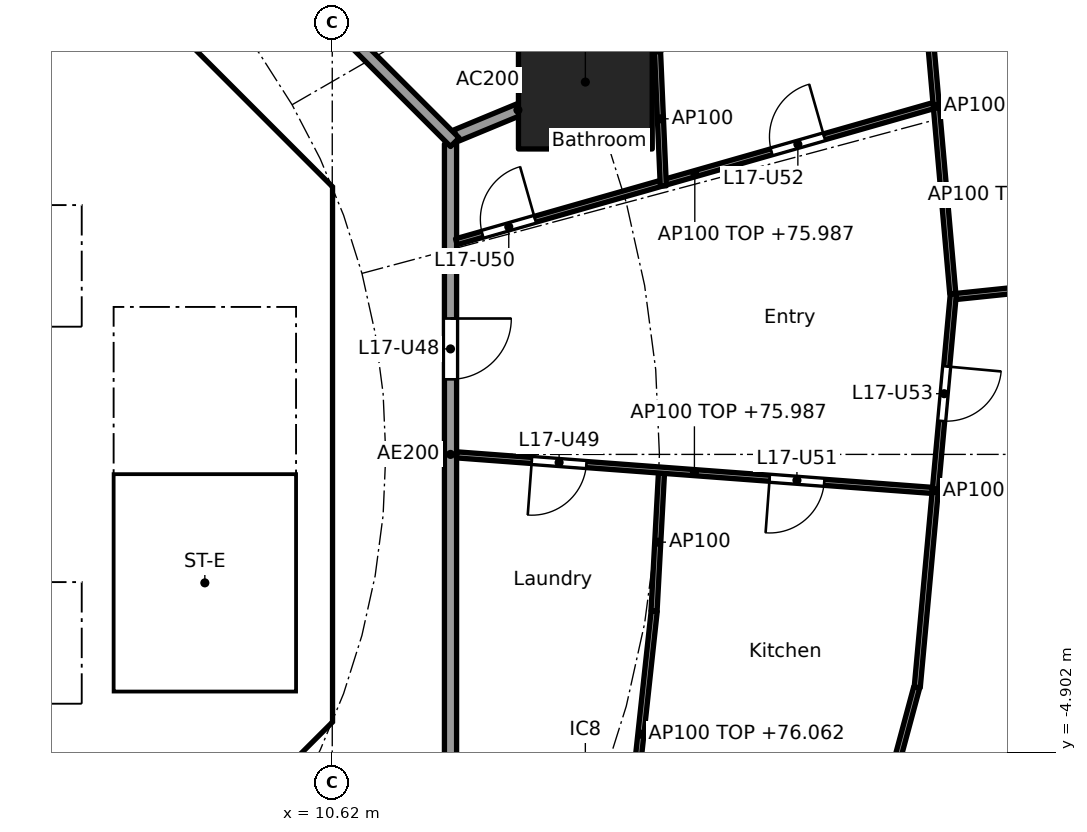
"""IFC4 building model, lengths in metres.
Left out: names, types, materials, properties, quantities, classifications, styles, units other than length and angle.
Written with IfcOpenShell. Run it as: python <this file> out.ifc"""

import sys

from ifc_helpers import new_model, si_unit, direction, frame, frame_2d, origin, origin_2d, place, context, subcontext, project, spatial, polyline, rectangle, outline, extrude, element, fill, save


model = new_model("IFC4")
c1 = context("Model", 3, precision=1e-05, world=origin(), true_north=direction((0.0, 1.0)))
c2 = subcontext(c1, "Body", "Model", "MODEL_VIEW")
j1 = project(units=[si_unit("LENGTHUNIT", "METRE"), si_unit("PLANEANGLEUNIT", "RADIAN")], contexts=[c1])
p1 = place(None, origin())
s1 = spatial("IfcSite", under=j1, at=p1, CompositionType="ELEMENT")
p2 = place(p1, origin())
s2 = spatial("IfcBuilding", under=s1, at=p2, CompositionType="ELEMENT")
p3 = place(p2, frame((0.0, 0.0, 73.3)))
s3 = spatial("IfcBuildingStorey", under=s2, at=p3, CompositionType="ELEMENT", Elevation=73.3)
p4 = place(p3, frame((14.782, 6.123, 0.0), z_axis=(0.0, 0.0, 1.0), x_axis=(1.0, 0.0, 0.0)))
e1 = element("IfcColumn", 1, at=p4, inside=s3, PredefinedType="COLUMN", context=c2, shape_type="SweptSolid", body=[
    extrude(rectangle(XDim=2.2, YDim=2.2, at=origin_2d()), origin(), (0.0, 0.0, 1.0), 3.7),
])
p5 = place(p3, frame((9.988, 4.613, 0.0), z_axis=(0.0, 0.0, 1.0), x_axis=(-0.707106781187, 0.707106781187, 0.0)))
e2 = element("IfcWall", 2, at=p5, inside=s3, PredefinedType="SHEAR", context=c2, shape_type="SweptSolid", body=[
    extrude(rectangle(XDim=7.602, YDim=0.6, at=frame_2d((3.801, 0.0))), origin(), (0.0, 0.0, 1.0), 3.44),
])
p6 = place(p5, frame((3.201, 0.0, 0.0)))
e3 = element("IfcOpeningElement", 3, at=p6, cuts=e2, PredefinedType="OPENING", context=c2, shape_type="SweptSolid", body=[
    extrude(rectangle(XDim=1.2, YDim=2.1, at=frame_2d((0.6, 1.05))), frame((0.0, 0.31, 0.0), z_axis=(0.0, -1.0, 0.0), x_axis=(1.0, 0.0, 0.0)), (0.0, 0.0, 1.0), 0.62),
])
p7 = place(p3, frame((4.613, -9.988, 0.0), z_axis=(0.0, 0.0, 1.0), x_axis=(0.707106781187, 0.707106781187, 0.0)))
e4 = element("IfcWall", 4, at=p7, inside=s3, PredefinedType="SHEAR", context=c2, shape_type="SweptSolid", body=[
    extrude(rectangle(XDim=7.602, YDim=0.6, at=frame_2d((3.801, 0.0))), origin(), (0.0, 0.0, 1.0), 3.44),
])
p8 = place(p7, frame((3.201, 0.0, 0.0)))
e5 = element("IfcOpeningElement", 5, at=p8, cuts=e4, PredefinedType="OPENING", context=c2, shape_type="SweptSolid", body=[
    extrude(rectangle(XDim=1.2, YDim=2.1, at=frame_2d((0.6, 1.05))), frame((0.0, 0.31, 0.0), z_axis=(0.0, -1.0, 0.0), x_axis=(1.0, 0.0, 0.0)), (0.0, 0.0, 1.0), 0.62),
])
p9 = place(p3, frame((-6.7, 2.0, 0.0), z_axis=(0.0, 0.0, 1.0), x_axis=(1.0, 0.0, 0.0)))
e6 = element("IfcWall", 6, at=p9, inside=s3, PredefinedType="SOLIDWALL", context=c2, shape_type="SweptSolid", body=[
    extrude(rectangle(XDim=13.4, YDim=0.2, at=frame_2d((6.7, 0.0))), origin(), (0.0, 0.0, 1.0), 3.44),
])
p10 = place(p9, frame((0.65, 0.0, 0.0)))
e7 = element("IfcOpeningElement", 7, at=p10, cuts=e6, PredefinedType="OPENING", context=c2, shape_type="SweptSolid", body=[
    extrude(rectangle(XDim=1.1, YDim=2.1, at=frame_2d((0.55, 1.05))), frame((0.0, 0.11, 0.0), z_axis=(0.0, -1.0, 0.0), x_axis=(1.0, 0.0, 0.0)), (0.0, 0.0, 1.0), 0.22),
])
p11 = place(p9, frame((2.85, 0.0, 0.0)))
e8 = element("IfcOpeningElement", 8, at=p11, cuts=e6, PredefinedType="OPENING", context=c2, shape_type="SweptSolid", body=[
    extrude(rectangle(XDim=1.1, YDim=2.1, at=frame_2d((0.55, 1.05))), frame((0.0, 0.11, 0.0), z_axis=(0.0, -1.0, 0.0), x_axis=(1.0, 0.0, 0.0)), (0.0, 0.0, 1.0), 0.22),
])
p12 = place(p9, frame((5.05, 0.0, 0.0)))
e9 = element("IfcOpeningElement", 9, at=p12, cuts=e6, PredefinedType="OPENING", context=c2, shape_type="SweptSolid", body=[
    extrude(rectangle(XDim=1.1, YDim=2.1, at=frame_2d((0.55, 1.05))), frame((0.0, 0.11, 0.0), z_axis=(0.0, -1.0, 0.0), x_axis=(1.0, 0.0, 0.0)), (0.0, 0.0, 1.0), 0.22),
])
p13 = place(p3, frame((6.7, 4.0, 0.0), z_axis=(0.0, 0.0, 1.0), x_axis=(1.0, 0.0, 0.0)))
e10 = element("IfcWall", 10, at=p13, inside=s3, PredefinedType="SOLIDWALL", context=c2, shape_type="SweptSolid", body=[
    extrude(rectangle(XDim=3.325, YDim=0.2, at=frame_2d((1.662, 0.0))), origin(), (0.0, 0.0, 1.0), 3.44),
])
p14 = place(p13, frame((1.25, 0.0, 0.0)))
e11 = element("IfcOpeningElement", 11, at=p14, cuts=e10, PredefinedType="OPENING", context=c2, shape_type="SweptSolid", body=[
    extrude(rectangle(XDim=1.1, YDim=2.1, at=frame_2d((0.55, 1.05))), frame((0.0, 0.11, 0.0), z_axis=(0.0, -1.0, 0.0), x_axis=(1.0, 0.0, 0.0)), (0.0, 0.0, 1.0), 0.22),
])
p15 = place(p3, frame((-6.7, -2.0, 0.0), z_axis=(0.0, 0.0, 1.0), x_axis=(1.0, 0.0, 0.0)))
e12 = element("IfcWall", 12, at=p15, inside=s3, PredefinedType="SOLIDWALL", context=c2, shape_type="SweptSolid", body=[
    extrude(rectangle(XDim=13.4, YDim=0.2, at=frame_2d((6.7, 0.0))), origin(), (0.0, 0.0, 1.0), 3.44),
])
p16 = place(p15, frame((0.65, 0.0, 0.0)))
e13 = element("IfcOpeningElement", 13, at=p16, cuts=e12, PredefinedType="OPENING", context=c2, shape_type="SweptSolid", body=[
    extrude(rectangle(XDim=1.1, YDim=2.1, at=frame_2d((0.55, 1.05))), frame((0.0, 0.11, 0.0), z_axis=(0.0, -1.0, 0.0), x_axis=(1.0, 0.0, 0.0)), (0.0, 0.0, 1.0), 0.22),
])
p17 = place(p15, frame((2.85, 0.0, 0.0)))
e14 = element("IfcOpeningElement", 14, at=p17, cuts=e12, PredefinedType="OPENING", context=c2, shape_type="SweptSolid", body=[
    extrude(rectangle(XDim=1.1, YDim=2.1, at=frame_2d((0.55, 1.05))), frame((0.0, 0.11, 0.0), z_axis=(0.0, -1.0, 0.0), x_axis=(1.0, 0.0, 0.0)), (0.0, 0.0, 1.0), 0.22),
])
p18 = place(p3, origin())
e15 = element("IfcWall", 15, at=p18, inside=s3, PredefinedType="SHEAR", context=c2, shape_type="SweptSolid", body=[
    extrude(outline(polyline([(9.776, -4.401), (10.025, -4.152), (10.025, -3.801), (10.025, 4.152), (9.776, 4.401), (10.2, 4.825), (10.625, 4.401), (10.625, -4.401), (10.2, -4.825), (9.776, -4.401)])), origin(), (0.0, 0.0, 1.0), 3.44),
])
p19 = place(p3, origin())
e16 = element("IfcWall", 16, at=p19, inside=s3, PredefinedType="SOLIDWALL", context=c2, shape_type="SweptSolid", body=[
    extrude(outline(polyline([(-6.7, -2.1), (-6.5, -2.1), (-6.5, -4.1), (-4.5, -4.1), (-4.5, -2.1), (-4.3, -2.1), (-4.3, -4.1), (-2.3, -4.1), (-2.3, -2.1), (-2.1, -2.1), (-2.1, -4.1), (-0.1, -4.1), (-0.1, -2.1), (0.1, -2.1), (0.1, -4.1), (2.1, -4.1), (2.1, -2.1), (2.3, -2.1), (2.3, -4.1), (4.3, -4.1), (4.3, -2.1), (4.5, -2.1), (4.5, -4.1), (6.5, -4.1), (6.5, -2.1), (6.7, -2.1), (6.7, -4.3), (-6.7, -4.3), (-6.7, -2.1)])), origin(), (0.0, 0.0, 1.0), 3.44),
])
p20 = place(p3, origin())
e17 = element("IfcWall", 17, at=p20, inside=s3, PredefinedType="SOLIDWALL", context=c2, shape_type="SweptSolid", body=[
    extrude(outline(polyline([(-6.5, 2.1), (-6.7, 2.1), (-6.7, 4.3), (6.7, 4.3), (6.7, 2.1), (6.5, 2.1), (6.5, 4.1), (4.5, 4.1), (4.5, 2.1), (4.3, 2.1), (4.3, 4.1), (2.3, 4.1), (2.3, 2.1), (2.1, 2.1), (2.1, 4.1), (0.1, 4.1), (0.1, 2.1), (-0.1, 2.1), (-0.1, 4.1), (-2.1, 4.1), (-2.1, 2.1), (-2.3, 2.1), (-2.3, 4.1), (-4.3, 4.1), (-4.3, 2.1), (-4.5, 2.1), (-4.5, 4.1), (-6.5, 4.1), (-6.5, 2.1)])), origin(), (0.0, 0.0, 1.0), 3.44),
])
p21 = place(p3, origin())
e18 = element("IfcWall", 18, at=p21, inside=s3, PredefinedType="SOLIDWALL", context=c2, shape_type="SweptSolid", body=[
    extrude(outline(polyline([(7.025, -3.9), (6.7, -3.9), (6.7, 3.9), (7.025, 3.9), (7.025, -3.9)])), origin(), (0.0, 0.0, 1.0), 3.44),
])
p22 = place(p3, origin())
e19 = element("IfcWall", 19, at=p22, inside=s3, PredefinedType="SOLIDWALL", context=c2, shape_type="SweptSolid", body=[
    extrude(outline(polyline([(10.025, -4.1), (6.7, -4.1), (6.7, -3.9), (10.025, -3.9), (10.025, -4.1)])), origin(), (0.0, 0.0, 1.0), 3.44),
])
p23 = place(p3, frame((12.657, 5.243, 0.0), z_axis=(0.0, 0.0, 1.0), x_axis=(0.923876145736, 0.382691608661, 0.0)))
e20 = element("IfcWall", 20, at=p23, inside=s3, PredefinedType="PARTITIONING", context=c2, shape_type="SweptSolid", body=[
    extrude(rectangle(XDim=2.2, YDim=0.2, at=frame_2d((1.1, 0.0))), origin(), (0.0, 0.0, 1.0), 3.44),
])
p24 = place(p3, frame((14.827, 6.146, 0.0), z_axis=(0.0, 0.0, 1.0), x_axis=(0.892068075337, 0.451901038906, 0.0)))
e21 = element("IfcWall", 21, at=p24, inside=s3, PredefinedType="PARTITIONING", context=c2, shape_type="SweptSolid", body=[
    extrude(rectangle(XDim=10.32, YDim=0.2, at=frame_2d((5.16, 0.0))), origin(), (0.0, 0.0, 1.0), 2.762),
])
p25 = place(p3, frame((12.565, -5.104, 0.0), z_axis=(0.0, 0.0, 1.0), x_axis=(0.0, 1.0, 0.0)))
e22 = element("IfcWall", 22, at=p25, inside=s3, PredefinedType="PARTITIONING", context=c2, shape_type="SweptSolid", body=[
    extrude(rectangle(XDim=10.209, YDim=0.2, at=frame_2d((5.104, 0.0))), origin(), (0.0, 0.0, 1.0), 3.44),
])
p26 = place(p25, frame((6.339, 0.0, 0.0)))
e23 = element("IfcOpeningElement", 23, at=p26, cuts=e22, PredefinedType="OPENING", context=c2, shape_type="SweptSolid", body=[
    extrude(rectangle(XDim=1.0, YDim=2.1, at=frame_2d((0.5, 1.05))), frame((0.0, 0.11, 0.0), z_axis=(0.0, -1.0, 0.0), x_axis=(1.0, 0.0, 0.0)), (0.0, 0.0, 1.0), 0.22),
])
p27 = place(p3, frame((12.635, 5.134, 0.0), z_axis=(0.0, 0.0, 1.0), x_axis=(-0.707106781187, 0.707106781187, 0.0)))
e24 = element("IfcWall", 24, at=p27, inside=s3, PredefinedType="PARTITIONING", context=c2, shape_type="SweptSolid", body=[
    extrude(rectangle(XDim=10.609, YDim=0.2, at=frame_2d((5.305, 0.0))), origin(), (0.0, 0.0, 1.0), 3.44),
])
p28 = place(p3, frame((20.879, 2.597, 0.0), z_axis=(0.0, 0.0, 1.0), x_axis=(0.994666546694, 0.103142914868, 0.0)))
e25 = element("IfcWall", 25, at=p28, inside=s3, PredefinedType="PARTITIONING", context=c2, shape_type="SweptSolid", body=[
    extrude(rectangle(XDim=3.998, YDim=0.1, at=frame_2d((1.999, 0.0))), origin(), (0.0, 0.0, 1.0), 2.762),
])
p29 = place(p28, frame((1.549, 0.0, 0.0)))
e26 = element("IfcOpeningElement", 26, at=p29, cuts=e25, PredefinedType="OPENING", context=c2, shape_type="SweptSolid", body=[
    extrude(rectangle(XDim=0.9, YDim=2.1, at=frame_2d((0.45, 1.05))), frame((0.0, 0.06, 0.0), z_axis=(0.0, -1.0, 0.0), x_axis=(1.0, 0.0, 0.0)), (0.0, 0.0, 1.0), 0.12),
])
p30 = place(p3, frame((20.825, 2.642, 0.0), z_axis=(0.0, 0.0, 1.0), x_axis=(-0.087760219522, 0.996141628419, 0.0)))
e27 = element("IfcWall", 27, at=p30, inside=s3, PredefinedType="PARTITIONING", context=c2, shape_type="SweptSolid", body=[
    extrude(rectangle(XDim=6.187, YDim=0.1, at=frame_2d((3.094, 0.0))), origin(), (0.0, 0.0, 1.0), 2.762),
])
p31 = place(p3, frame((20.834, 2.642, 0.0), z_axis=(0.0, 0.0, 1.0), x_axis=(-0.091385407685, -0.995815599025, 0.0)))
e28 = element("IfcWall", 28, at=p31, inside=s3, PredefinedType="PARTITIONING", context=c2, shape_type="SweptSolid", body=[
    extrude(rectangle(XDim=6.502, YDim=0.1, at=frame_2d((3.251, 0.0))), origin(), (0.0, 0.0, 1.0), 2.762),
])
p32 = place(p31, frame((1.201, 0.0, 0.0)))
e29 = element("IfcOpeningElement", 29, at=p32, cuts=e28, PredefinedType="OPENING", context=c2, shape_type="SweptSolid", body=[
    extrude(rectangle(XDim=0.9, YDim=2.1, at=frame_2d((0.45, 1.05))), frame((0.0, 0.06, 0.0), z_axis=(0.0, -1.0, 0.0), x_axis=(1.0, 0.0, 0.0)), (0.0, 0.0, 1.0), 0.12),
])
p33 = place(p3, frame((12.661, 3.497, 0.0), z_axis=(0.0, 0.0, 1.0), x_axis=(0.961626678623, 0.274361314621, 0.0)))
e30 = element("IfcWall", 30, at=p33, inside=s3, PredefinedType="PARTITIONING", context=c2, shape_type="SweptSolid", body=[
    extrude(rectangle(XDim=8.156, YDim=0.1, at=frame_2d((4.078, 0.0))), origin(), (0.0, 0.0, 1.0), 2.687),
])
p34 = place(p33, frame((0.446, 0.0, 0.0)))
e31 = element("IfcOpeningElement", 31, at=p34, cuts=e30, PredefinedType="OPENING", context=c2, shape_type="SweptSolid", body=[
    extrude(rectangle(XDim=0.9, YDim=2.1, at=frame_2d((0.45, 1.05))), frame((0.0, 0.06, 0.0), z_axis=(0.0, -1.0, 0.0), x_axis=(1.0, 0.0, 0.0)), (0.0, 0.0, 1.0), 0.12),
])
p35 = place(p33, frame((5.39, 0.0, 0.0)))
e32 = element("IfcOpeningElement", 32, at=p35, cuts=e30, PredefinedType="OPENING", context=c2, shape_type="SweptSolid", body=[
    extrude(rectangle(XDim=0.9, YDim=2.1, at=frame_2d((0.45, 1.05))), frame((0.0, 0.06, 0.0), z_axis=(0.0, -1.0, 0.0), x_axis=(1.0, 0.0, 0.0)), (0.0, 0.0, 1.0), 0.12),
])
p36 = place(p3, frame((16.064, 4.415, 0.0), z_axis=(0.0, 0.0, 1.0), x_axis=(-0.043101501373, 0.999070698489, 0.0)))
e33 = element("IfcWall", 33, at=p36, inside=s3, PredefinedType="PARTITIONING", context=c2, shape_type="SweptSolid", body=[
    extrude(rectangle(XDim=2.209, YDim=0.1, at=frame_2d((1.104, 0.0))), origin(), (0.0, 0.0, 1.0), 3.44),
])
p37 = place(p3, frame((15.477, -6.625, 0.0), z_axis=(0.0, 0.0, 1.0), x_axis=(0.107561928907, 0.994198386365, 0.0)))
e34 = element("IfcWall", 34, at=p37, inside=s3, PredefinedType="PARTITIONING", context=c2, shape_type="SweptSolid", body=[
    extrude(rectangle(XDim=4.072, YDim=0.1, at=frame_2d((2.036, 0.0))), origin(), (0.0, 0.0, 1.0), 2.762),
])
p38 = place(p3, frame((18.713, -9.464, 0.0), z_axis=(0.0, 0.0, 1.0), x_axis=(0.260279646259, 0.965533275316, 0.0)))
e35 = element("IfcWall", 35, at=p38, inside=s3, PredefinedType="PARTITIONING", context=c2, shape_type="SweptSolid", body=[
    extrude(rectangle(XDim=5.833, YDim=0.1, at=frame_2d((2.917, 0.0))), origin(), (0.0, 0.0, 1.0), 2.762),
])
p39 = place(p3, frame((15.912, -2.577, 0.0), z_axis=(0.0, 0.0, 1.0), x_axis=(0.053749298185, 0.998554461682, 0.0)))
e36 = element("IfcWall", 36, at=p39, inside=s3, PredefinedType="PARTITIONING", context=c2, shape_type="SweptSolid", body=[
    extrude(rectangle(XDim=2.271, YDim=0.1, at=frame_2d((1.135, 0.0))), origin(), (0.0, 0.0, 1.0), 3.44),
])
p40 = place(p3, frame((12.665, -0.008, 0.0), z_axis=(0.0, 0.0, 1.0), x_axis=(0.997222647159, -0.074478130978, 0.0)))
e37 = element("IfcWall", 37, at=p40, inside=s3, PredefinedType="PARTITIONING", context=c2, shape_type="SweptSolid", body=[
    extrude(rectangle(XDim=7.844, YDim=0.1, at=frame_2d((3.922, 0.0))), origin(), (0.0, 0.0, 1.0), 2.687),
])
p41 = place(p40, frame((1.241, 0.0, 0.0)))
e38 = element("IfcOpeningElement", 38, at=p41, cuts=e37, PredefinedType="OPENING", context=c2, shape_type="SweptSolid", body=[
    extrude(rectangle(XDim=0.9, YDim=2.1, at=frame_2d((0.45, 1.05))), frame((0.0, 0.06, 0.0), z_axis=(0.0, -1.0, 0.0), x_axis=(1.0, 0.0, 0.0)), (0.0, 0.0, 1.0), 0.12),
])
p42 = place(p40, frame((5.163, 0.0, 0.0)))
e39 = element("IfcOpeningElement", 39, at=p42, cuts=e37, PredefinedType="OPENING", context=c2, shape_type="SweptSolid", body=[
    extrude(rectangle(XDim=0.9, YDim=2.1, at=frame_2d((0.45, 1.05))), frame((0.0, 0.06, 0.0), z_axis=(0.0, -1.0, 0.0), x_axis=(1.0, 0.0, 0.0)), (0.0, 0.0, 1.0), 0.12),
])
p43 = place(p14, frame((1.1, 0.0, 0.0), x_axis=(-1.0, 0.0, 0.0)))
e40 = element("IfcDoor", 40, at=p43, inside=s3, OperationType="SINGLE_SWING_RIGHT", PredefinedType="DOOR", context=c2, shape_type="SweptSolid", body=[
    extrude(rectangle(XDim=1.1, YDim=2.1, at=frame_2d((0.55, 1.05))), frame((0.0, 0.025, 0.0), z_axis=(0.0, -1.0, 0.0), x_axis=(1.0, 0.0, 0.0)), (0.0, 0.0, 1.0), 0.05),
])
fill(e11, e40)
p44 = place(p26, frame((1.0, 0.0, 0.0), x_axis=(-1.0, 0.0, 0.0)))
e41 = element("IfcDoor", 41, at=p44, inside=s3, OperationType="SINGLE_SWING_LEFT", PredefinedType="DOOR", context=c2, shape_type="SweptSolid", body=[
    extrude(rectangle(XDim=1.0, YDim=2.1, at=frame_2d((0.5, 1.05))), frame((0.0, 0.025, 0.0), z_axis=(0.0, -1.0, 0.0), x_axis=(1.0, 0.0, 0.0)), (0.0, 0.0, 1.0), 0.05),
])
fill(e23, e41)
p45 = place(p41, frame((0.9, 0.0, 0.0), x_axis=(-1.0, 0.0, 0.0)))
e42 = element("IfcDoor", 42, at=p45, inside=s3, OperationType="SINGLE_SWING_RIGHT", PredefinedType="DOOR", context=c2, shape_type="SweptSolid", body=[
    extrude(rectangle(XDim=0.9, YDim=2.1, at=frame_2d((0.45, 1.05))), frame((0.0, 0.025, 0.0), z_axis=(0.0, -1.0, 0.0), x_axis=(1.0, 0.0, 0.0)), (0.0, 0.0, 1.0), 0.05),
])
fill(e38, e42)
p46 = place(p34, origin())
e43 = element("IfcDoor", 43, at=p46, inside=s3, OperationType="SINGLE_SWING_RIGHT", PredefinedType="DOOR", context=c2, shape_type="SweptSolid", body=[
    extrude(rectangle(XDim=0.9, YDim=2.1, at=frame_2d((0.45, 1.05))), frame((0.0, 0.025, 0.0), z_axis=(0.0, -1.0, 0.0), x_axis=(1.0, 0.0, 0.0)), (0.0, 0.0, 1.0), 0.05),
])
fill(e31, e43)
p47 = place(p42, frame((0.9, 0.0, 0.0), x_axis=(-1.0, 0.0, 0.0)))
e44 = element("IfcDoor", 44, at=p47, inside=s3, OperationType="SINGLE_SWING_RIGHT", PredefinedType="DOOR", context=c2, shape_type="SweptSolid", body=[
    extrude(rectangle(XDim=0.9, YDim=2.1, at=frame_2d((0.45, 1.05))), frame((0.0, 0.025, 0.0), z_axis=(0.0, -1.0, 0.0), x_axis=(1.0, 0.0, 0.0)), (0.0, 0.0, 1.0), 0.05),
])
fill(e39, e44)
p48 = place(p35, origin())
e45 = element("IfcDoor", 45, at=p48, inside=s3, OperationType="SINGLE_SWING_RIGHT", PredefinedType="DOOR", context=c2, shape_type="SweptSolid", body=[
    extrude(rectangle(XDim=0.9, YDim=2.1, at=frame_2d((0.45, 1.05))), frame((0.0, 0.025, 0.0), z_axis=(0.0, -1.0, 0.0), x_axis=(1.0, 0.0, 0.0)), (0.0, 0.0, 1.0), 0.05),
])
fill(e32, e45)
p49 = place(p32, origin())
e46 = element("IfcDoor", 46, at=p49, inside=s3, OperationType="SINGLE_SWING_LEFT", PredefinedType="DOOR", context=c2, shape_type="SweptSolid", body=[
    extrude(rectangle(XDim=0.9, YDim=2.1, at=frame_2d((0.45, 1.05))), frame((0.0, 0.025, 0.0), z_axis=(0.0, -1.0, 0.0), x_axis=(1.0, 0.0, 0.0)), (0.0, 0.0, 1.0), 0.05),
])
fill(e29, e46)
save(model, sys.argv[1])
